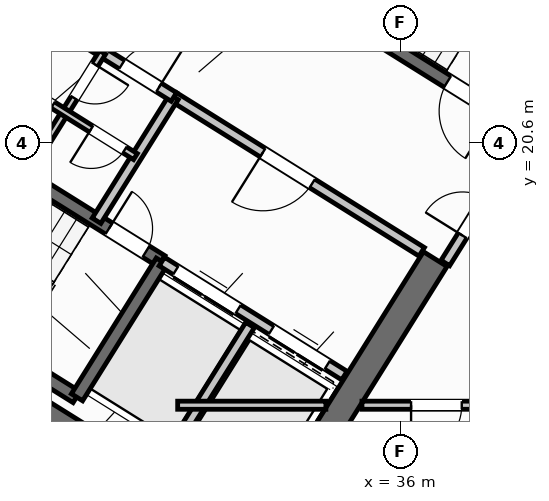
"""IFC4 building model, lengths in metres.
Left out: names, types, materials, properties, quantities, classifications, styles, units other than length and angle.
Written with IfcOpenShell. Run it as: python <this file> out.ifc"""

import sys

from ifc_helpers import new_model, si_unit, direction, frame, frame_2d, origin, place, context, subcontext, project, spatial, rectangle, extrude, source, transform, mapped, element, fill, save


model = new_model("IFC4")
c1 = context("Model", 3, precision=1e-05, world=origin(), true_north=direction((0.0, 1.0)))
c2 = subcontext(c1, "Body", "Model", "MODEL_VIEW")
j1 = project(units=[si_unit("LENGTHUNIT", "METRE"), si_unit("PLANEANGLEUNIT", "RADIAN")], contexts=[c1])
p1 = place(None, origin())
s1 = spatial("IfcSite", under=j1, at=p1, CompositionType="ELEMENT")
p2 = place(p1, origin())
s2 = spatial("IfcBuilding", under=s1, at=p2, CompositionType="ELEMENT")
p3 = place(p2, frame((0.0, 0.0, 158.7)))
s3 = spatial("IfcBuildingStorey", under=s2, at=p3, CompositionType="ELEMENT", Elevation=158.7)
p4 = place(p3, frame((33.366, 12.477, 0.0), z_axis=(0.0, 0.0, 1.0), x_axis=(-0.848047359947, 0.529920442413, 0.0)))
e1 = element("IfcWall", 1, at=p4, inside=s3, PredefinedType="SHEAR", context=c2, shape_type="SweptSolid", body=[
    extrude(rectangle(XDim=13.14, YDim=0.55, at=frame_2d((6.57, 0.0))), origin(), (0.0, 0.0, 1.0), 3.35),
])
p5 = place(p3, frame((36.683, 18.304, 0.0), z_axis=(0.0, 0.0, 1.0), x_axis=(-0.529896466841, -0.848062341122, 0.0)))
e2 = element("IfcWall", 2, at=p5, inside=s3, PredefinedType="SHEAR", context=c2, shape_type="SweptSolid", body=[
    extrude(rectangle(XDim=6.425, YDim=0.55, at=frame_2d((3.212, 0.0))), origin(), (0.0, 0.0, 1.0), 3.35),
])
p6 = place(p3, frame((29.268, 6.429, 0.0), z_axis=(0.0, 0.0, 1.0), x_axis=(-0.848049971435, 0.529916263149, 0.0)))
e3 = element("IfcWall", 3, at=p6, inside=s3, PredefinedType="STANDARD", context=c2, shape_type="SweptSolid", body=[
    extrude(rectangle(XDim=31.588, YDim=0.32, at=frame_2d((15.794, 0.0))), origin(), (0.0, 0.0, 1.0), 3.35),
])
p7 = place(p6, frame((16.362, 0.0, 0.0)))
e4 = element("IfcOpeningElement", 4, at=p7, cuts=e3, PredefinedType="OPENING", context=c2, shape_type="SweptSolid", body=[
    extrude(rectangle(XDim=1.2, YDim=2.15, at=frame_2d((0.6, 1.075))), frame((0.0, 0.17, 0.0), z_axis=(0.0, -1.0, 0.0), x_axis=(1.0, 0.0, 0.0)), (0.0, 0.0, 1.0), 0.34),
])
p8 = place(p6, frame((2.989, 0.0, 0.8)))
e5 = element("IfcOpeningElement", 5, at=p8, cuts=e3, PredefinedType="OPENING", context=c2, shape_type="SweptSolid", body=[
    extrude(rectangle(XDim=2.1, YDim=1.55, at=frame_2d((1.05, 0.775))), frame((0.0, 0.17, 0.0), z_axis=(0.0, -1.0, 0.0), x_axis=(1.0, 0.0, 0.0)), (0.0, 0.0, 1.0), 0.34),
])
p9 = place(p6, frame((8.359, 0.0, 0.8)))
e6 = element("IfcOpeningElement", 6, at=p9, cuts=e3, PredefinedType="OPENING", context=c2, shape_type="SweptSolid", body=[
    extrude(rectangle(XDim=2.1, YDim=1.55, at=frame_2d((1.05, 0.775))), frame((0.0, 0.17, 0.0), z_axis=(0.0, -1.0, 0.0), x_axis=(1.0, 0.0, 0.0)), (0.0, 0.0, 1.0), 0.34),
])
p10 = place(p6, frame((13.284, 0.0, 0.95)))
e7 = element("IfcOpeningElement", 7, at=p10, cuts=e3, PredefinedType="OPENING", context=c2, shape_type="SweptSolid", body=[
    extrude(rectangle(XDim=1.2, YDim=1.4, at=frame_2d((0.6, 0.7))), frame((0.0, 0.17, 0.0), z_axis=(0.0, -1.0, 0.0), x_axis=(1.0, 0.0, 0.0)), (0.0, 0.0, 1.0), 0.34),
])
p11 = place(p6, frame((20.259, 0.0, 0.95)))
e8 = element("IfcOpeningElement", 8, at=p11, cuts=e3, PredefinedType="OPENING", context=c2, shape_type="SweptSolid", body=[
    extrude(rectangle(XDim=1.2, YDim=1.4, at=frame_2d((0.6, 0.7))), frame((0.0, 0.17, 0.0), z_axis=(0.0, -1.0, 0.0), x_axis=(1.0, 0.0, 0.0)), (0.0, 0.0, 1.0), 0.34),
])
p12 = place(p6, frame((22.929, 0.0, 0.95)))
e9 = element("IfcOpeningElement", 9, at=p12, cuts=e3, PredefinedType="OPENING", context=c2, shape_type="SweptSolid", body=[
    extrude(rectangle(XDim=1.2, YDim=1.4, at=frame_2d((0.6, 0.7))), frame((0.0, 0.17, 0.0), z_axis=(0.0, -1.0, 0.0), x_axis=(1.0, 0.0, 0.0)), (0.0, 0.0, 1.0), 0.34),
])
p13 = place(p6, frame((27.481, 0.0, 0.8)))
e10 = element("IfcOpeningElement", 10, at=p13, cuts=e3, PredefinedType="OPENING", context=c2, shape_type="SweptSolid", body=[
    extrude(rectangle(XDim=2.1, YDim=1.55, at=frame_2d((1.05, 0.775))), frame((0.0, 0.17, 0.0), z_axis=(0.0, -1.0, 0.0), x_axis=(1.0, 0.0, 0.0)), (0.0, 0.0, 1.0), 0.34),
])
p14 = place(p3, frame((29.605, 15.581, 0.0), z_axis=(0.0, 0.0, 1.0), x_axis=(-0.848036911448, 0.529937163087, 0.0)))
e11 = element("IfcWall", 11, at=p14, inside=s3, PredefinedType="SHEAR", context=c2, shape_type="SweptSolid", body=[
    extrude(rectangle(XDim=7.46, YDim=0.26, at=frame_2d((3.73, 0.0))), origin(), (0.0, 0.0, 1.0), 3.35),
])
p15 = place(p3, frame((31.28, 18.261, 0.0), z_axis=(0.0, 0.0, 1.0), x_axis=(-0.848051618787, 0.529913626805, 0.0)))
e12 = element("IfcWall", 12, at=p15, inside=s3, PredefinedType="SHEAR", context=c2, shape_type="SweptSolid", body=[
    extrude(rectangle(XDim=7.46, YDim=0.26, at=frame_2d((3.73, 0.0))), origin(), (0.0, 0.0, 1.0), 3.35),
])
p16 = place(p15, frame((0.36, 0.0, 0.0)))
e13 = element("IfcOpeningElement", 13, at=p16, cuts=e12, PredefinedType="OPENING", context=c2, shape_type="SweptSolid", body=[
    extrude(rectangle(XDim=0.86, YDim=2.05, at=frame_2d((0.43, 1.025))), frame((0.0, 0.14, 0.0), z_axis=(0.0, -1.0, 0.0), x_axis=(1.0, 0.0, 0.0)), (0.0, 0.0, 1.0), 0.28),
])
p17 = place(p3, frame((31.288, 18.256, 0.0), z_axis=(0.0, 0.0, 1.0), x_axis=(-0.529943379326, -0.848033026897, 0.0)))
e14 = element("IfcWall", 14, at=p17, inside=s3, PredefinedType="SHEAR", context=c2, shape_type="SweptSolid", body=[
    extrude(rectangle(XDim=3.16, YDim=0.26, at=frame_2d((1.58, 0.0))), origin(), (0.0, 0.0, 1.0), 3.35),
])
p18 = place(p3, frame((38.046, 21.108, 0.0), z_axis=(0.0, 0.0, 1.0), x_axis=(-0.848054434086, 0.529909121291, 0.0)))
e15 = element("IfcWall", 15, at=p18, inside=s3, PredefinedType="SHEAR", context=c2, shape_type="SweptSolid", body=[
    extrude(rectangle(XDim=7.33, YDim=0.26, at=frame_2d((3.665, 0.0))), origin(), (0.0, 0.0, 1.0), 3.35),
])
p19 = place(p18, frame((0.22, 0.0, 0.0)))
e16 = element("IfcOpeningElement", 16, at=p19, cuts=e15, PredefinedType="OPENING", context=c2, shape_type="SweptSolid", body=[
    extrude(rectangle(XDim=1.1, YDim=2.1, at=frame_2d((0.55, 1.05))), frame((0.0, 0.14, 0.0), z_axis=(0.0, -1.0, 0.0), x_axis=(1.0, 0.0, 0.0)), (0.0, 0.0, 1.0), 0.28),
])
p20 = place(p3, frame((34.891, 16.005, 0.0), z_axis=(0.0, 0.0, 1.0), x_axis=(-0.848062873452, 0.529895614884, 0.0)))
e17 = element("IfcWall", 17, at=p20, inside=s3, PredefinedType="STANDARD", context=c2, shape_type="SweptSolid", body=[
    extrude(rectangle(XDim=4.248, YDim=0.2, at=frame_2d((2.124, 0.0))), origin(), (0.0, 0.0, 1.0), 3.34),
])
p21 = place(p20, frame((0.398, 0.0, 0.0)))
e18 = element("IfcOpeningElement", 18, at=p21, cuts=e17, PredefinedType="OPENING", context=c2, shape_type="SweptSolid", body=[
    extrude(rectangle(XDim=1.3, YDim=2.2, at=frame_2d((0.65, 1.1))), frame((0.0, 0.11, 0.0), z_axis=(0.0, -1.0, 0.0), x_axis=(1.0, 0.0, 0.0)), (0.0, 0.0, 1.0), 0.22),
])
p22 = place(p20, frame((2.473, 0.0, 0.0)))
e19 = element("IfcOpeningElement", 19, at=p22, cuts=e17, PredefinedType="OPENING", context=c2, shape_type="SweptSolid", body=[
    extrude(rectangle(XDim=1.45, YDim=2.25, at=frame_2d((0.725, 1.125))), frame((0.0, 0.11, 0.0), z_axis=(0.0, -1.0, 0.0), x_axis=(1.0, 0.0, 0.0)), (0.0, 0.0, 1.0), 0.22),
])
p23 = place(p3, frame((36.417, 18.447, 0.0), z_axis=(0.0, 0.0, 1.0), x_axis=(-0.848064879198, 0.529892404805, 0.0)))
e20 = element("IfcWall", 20, at=p23, inside=s3, PredefinedType="STANDARD", context=c2, shape_type="SweptSolid", body=[
    extrude(rectangle(XDim=5.768, YDim=0.2, at=frame_2d((2.884, 0.0))), origin(), (0.0, 0.0, 1.0), 3.34),
])
p24 = place(p23, frame((2.548, 0.0, 0.0)))
e21 = element("IfcOpeningElement", 21, at=p24, cuts=e20, PredefinedType="OPENING", context=c2, shape_type="SweptSolid", body=[
    extrude(rectangle(XDim=1.15, YDim=2.1, at=frame_2d((0.575, 1.05))), frame((0.0, 0.11, 0.0), z_axis=(0.0, -1.0, 0.0), x_axis=(1.0, 0.0, 0.0)), (0.0, 0.0, 1.0), 0.22),
])
p25 = place(p3, frame((33.029, 17.003, 0.0), z_axis=(0.0, 0.0, 1.0), x_axis=(-0.529916267533, -0.848049968695, 0.0)))
e22 = element("IfcWall", 22, at=p25, inside=s3, PredefinedType="STANDARD", context=c2, shape_type="SweptSolid", body=[
    extrude(rectangle(XDim=2.92, YDim=0.2, at=frame_2d((1.46, 0.0))), origin(), (0.0, 0.0, 1.0), 3.34),
])
p26 = place(p3, frame((31.525, 21.504, 0.0), z_axis=(0.0, 0.0, 1.0), x_axis=(-0.529907497854, -0.848055448493, 0.0)))
e23 = element("IfcWall", 23, at=p26, inside=s3, PredefinedType="STANDARD", context=c2, shape_type="SweptSolid", body=[
    extrude(rectangle(XDim=2.88, YDim=0.2, at=frame_2d((1.44, 0.0))), origin(), (0.0, 0.0, 1.0), 3.34),
])
p27 = place(p3, frame((31.525, 21.504, 0.0), z_axis=(0.0, 0.0, 1.0), x_axis=(-0.848040211232, 0.529931882541, 0.0)))
e24 = element("IfcWall", 24, at=p27, inside=s3, PredefinedType="STANDARD", context=c2, shape_type="SweptSolid", body=[
    extrude(rectangle(XDim=6.218, YDim=0.2, at=frame_2d((3.109, 0.0))), origin(), (0.0, 0.0, 1.0), 3.34),
])
p28 = place(p27, frame((4.4, 0.0, 0.0)))
e25 = element("IfcOpeningElement", 25, at=p28, cuts=e24, PredefinedType="OPENING", context=c2, shape_type="SweptSolid", body=[
    extrude(rectangle(XDim=0.86, YDim=2.05, at=frame_2d((0.43, 1.025))), frame((0.0, 0.11, 0.0), z_axis=(0.0, -1.0, 0.0), x_axis=(1.0, 0.0, 0.0)), (0.0, 0.0, 1.0), 0.22),
])
p29 = place(p27, frame((0.35, 0.0, 0.0)))
e26 = element("IfcOpeningElement", 26, at=p29, cuts=e24, PredefinedType="OPENING", context=c2, shape_type="SweptSolid", body=[
    extrude(rectangle(XDim=0.86, YDim=2.05, at=frame_2d((0.43, 1.025))), frame((0.0, 0.11, 0.0), z_axis=(0.0, -1.0, 0.0), x_axis=(1.0, 0.0, 0.0)), (0.0, 0.0, 1.0), 0.22),
])
p30 = place(p3, frame((30.117, 22.384, 0.0), z_axis=(0.0, 0.0, 1.0), x_axis=(-0.529951914384, -0.848027693204, 0.0)))
e27 = element("IfcWall", 27, at=p30, inside=s3, PredefinedType="PLUMBINGWALL", context=c2, shape_type="SweptSolid", body=[
    extrude(rectangle(XDim=1.4, YDim=0.14, at=frame_2d((0.7, 0.0))), origin(), (0.0, 0.0, 1.0), 3.34),
])
p31 = place(p30, frame((0.28, 0.0, 0.0)))
e28 = element("IfcOpeningElement", 28, at=p31, cuts=e27, PredefinedType="OPENING", context=c2, shape_type="SweptSolid", body=[
    extrude(rectangle(XDim=0.78, YDim=2.05, at=frame_2d((0.39, 1.025))), frame((0.0, 0.08, 0.0), z_axis=(0.0, -1.0, 0.0), x_axis=(1.0, 0.0, 0.0)), (0.0, 0.0, 1.0), 0.16),
])
p32 = place(p3, frame((29.375, 21.196, 0.0), z_axis=(0.0, 0.0, 1.0), x_axis=(-0.529865479138, -0.848081702443, 0.0)))
e29 = element("IfcWall", 29, at=p32, inside=s3, PredefinedType="PLUMBINGWALL", context=c2, shape_type="SweptSolid", body=[
    extrude(rectangle(XDim=1.48, YDim=0.14, at=frame_2d((0.74, 0.0))), origin(), (0.0, 0.0, 1.0), 3.34),
])
p33 = place(p3, frame((30.766, 20.327, 0.0), z_axis=(0.0, 0.0, 1.0), x_axis=(-0.848052663127, 0.529911955482, 0.0)))
e30 = element("IfcWall", 30, at=p33, inside=s3, PredefinedType="PLUMBINGWALL", context=c2, shape_type="SweptSolid", body=[
    extrude(rectangle(XDim=3.28, YDim=0.14, at=frame_2d((1.64, 0.0))), origin(), (0.0, 0.0, 1.0), 3.34),
])
p34 = place(p33, frame((0.25, 0.0, 0.0)))
e31 = element("IfcOpeningElement", 31, at=p34, cuts=e30, PredefinedType="OPENING", context=c2, shape_type="SweptSolid", body=[
    extrude(rectangle(XDim=0.78, YDim=2.05, at=frame_2d((0.39, 1.025))), frame((0.0, 0.08, 0.0), z_axis=(0.0, -1.0, 0.0), x_axis=(1.0, 0.0, 0.0)), (0.0, 0.0, 1.0), 0.16),
])
p35 = place(p33, frame((1.92, 0.0, 0.0)))
e32 = element("IfcOpeningElement", 32, at=p35, cuts=e30, PredefinedType="OPENING", context=c2, shape_type="SweptSolid", body=[
    extrude(rectangle(XDim=0.78, YDim=2.05, at=frame_2d((0.39, 1.025))), frame((0.0, 0.08, 0.0), z_axis=(0.0, -1.0, 0.0), x_axis=(1.0, 0.0, 0.0)), (0.0, 0.0, 1.0), 0.16),
])
p36 = place(p3, frame((32.164, 10.374, 0.0), z_axis=(0.0, 0.0, 1.0), x_axis=(-0.848044107957, 0.529925646633, 0.0)))
e33 = element("IfcWall", 33, at=p36, inside=s3, PredefinedType="PARTITIONING", context=c2, shape_type="SweptSolid", body=[
    extrude(rectangle(XDim=15.57, YDim=0.16, at=frame_2d((7.785, 0.0))), origin(), (0.0, 0.0, 1.0), 3.34),
])
p37 = place(p36, frame((10.83, 0.0, 0.0)))
e34 = element("IfcOpeningElement", 34, at=p37, cuts=e33, PredefinedType="OPENING", context=c2, shape_type="SweptSolid", body=[
    extrude(rectangle(XDim=1.0, YDim=2.1, at=frame_2d((0.5, 1.05))), frame((0.0, 0.09, 0.0), z_axis=(0.0, -1.0, 0.0), x_axis=(1.0, 0.0, 0.0)), (0.0, 0.0, 1.0), 0.18),
])
p38 = place(p3, frame((29.72, 8.859, 0.0), z_axis=(0.0, 0.0, 1.0), x_axis=(-0.848049134363, 0.529917602752, 0.0)))
e35 = element("IfcWall", 35, at=p38, inside=s3, PredefinedType="PLUMBINGWALL", context=c2, shape_type="SweptSolid", body=[
    extrude(rectangle(XDim=14.3, YDim=0.14, at=frame_2d((7.15, 0.0))), origin(), (0.0, 0.0, 1.0), 3.34),
])
p39 = place(p38, frame((9.57, 0.0, 0.0)))
e36 = element("IfcOpeningElement", 36, at=p39, cuts=e35, PredefinedType="OPENING", context=c2, shape_type="SweptSolid", body=[
    extrude(rectangle(XDim=0.92, YDim=2.08, at=frame_2d((0.46, 1.04))), frame((0.0, 0.08, 0.0), z_axis=(0.0, -1.0, 0.0), x_axis=(1.0, 0.0, 0.0)), (0.0, 0.0, 1.0), 0.16),
])
p40 = place(p3, frame((38.451, 20.737, 0.0), z_axis=(0.0, 0.0, 1.0), x_axis=(-0.529924799939, -0.848044637038, 0.0)))
e37 = element("IfcWall", 37, at=p40, inside=s3, PredefinedType="STANDARD", context=c2, shape_type="SweptSolid", body=[
    extrude(rectangle(XDim=2.96, YDim=0.2, at=frame_2d((1.48, 0.0))), origin(), (0.0, 0.0, 1.0), 3.34),
])
p41 = place(p40, frame((1.46, 0.0, 0.0)))
e38 = element("IfcOpeningElement", 38, at=p41, cuts=e37, PredefinedType="OPENING", context=c2, shape_type="SweptSolid", body=[
    extrude(rectangle(XDim=0.86, YDim=2.05, at=frame_2d((0.43, 1.025))), frame((0.0, 0.11, 0.0), z_axis=(0.0, -1.0, 0.0), x_axis=(1.0, 0.0, 0.0)), (0.0, 0.0, 1.0), 0.22),
])
p42 = place(p3, frame((31.6, 15.42, 0.0), z_axis=(0.0, 0.0, 1.0), x_axis=(1.0, 0.0, 0.0)))
e39 = element("IfcWall", 39, at=p42, inside=s3, PredefinedType="PARTITIONING", context=c2, shape_type="SweptSolid", body=[
    extrude(rectangle(XDim=2.925, YDim=0.16, at=frame_2d((1.462, 0.0))), origin(), (0.0, 0.0, 1.0), 3.34),
])
p43 = place(p3, frame((35.237, 15.42, 0.0), z_axis=(0.0, 0.0, 1.0), x_axis=(1.0, 0.0, 0.0)))
e40 = element("IfcWall", 40, at=p43, inside=s3, PredefinedType="PARTITIONING", context=c2, shape_type="SweptSolid", body=[
    extrude(rectangle(XDim=15.432, YDim=0.16, at=frame_2d((7.716, 0.0))), origin(), (0.0, 0.0, 1.0), 3.34),
])
p44 = place(p43, frame((0.969, 0.0, 0.0)))
e41 = element("IfcOpeningElement", 41, at=p44, cuts=e40, PredefinedType="OPENING", context=c2, shape_type="SweptSolid", body=[
    extrude(rectangle(XDim=1.0, YDim=2.1, at=frame_2d((0.5, 1.05))), frame((0.0, 0.09, 0.0), z_axis=(0.0, -1.0, 0.0), x_axis=(1.0, 0.0, 0.0)), (0.0, 0.0, 1.0), 0.18),
])
p45 = place(p43, frame((8.799, 0.0, 0.0)))
e42 = element("IfcOpeningElement", 42, at=p45, cuts=e40, PredefinedType="OPENING", context=c2, shape_type="SweptSolid", body=[
    extrude(rectangle(XDim=1.0, YDim=2.1, at=frame_2d((0.5, 1.05))), frame((0.0, 0.09, 0.0), z_axis=(0.0, -1.0, 0.0), x_axis=(1.0, 0.0, 0.0)), (0.0, 0.0, 1.0), 0.18),
])
m1 = source(origin(), c2, "Body", "SweptSolid", [
    extrude(rectangle(XDim=0.86, YDim=2.05, at=frame_2d((0.43, 1.025))), frame((0.0, 0.025, 0.0), z_axis=(0.0, -1.0, 0.0), x_axis=(1.0, 0.0, 0.0)), (0.0, 0.0, 1.0), 0.05),
])
p46 = place(p16, frame((0.86, 0.0, 0.0), z_axis=(0.0, 0.0, 1.0), x_axis=(-1.0, 0.0, 0.0)))
e43 = element("IfcDoor", 43, at=p46, inside=s3, OperationType="SINGLE_SWING_LEFT", PredefinedType="DOOR", context=c2, shape_type="MappedRepresentation", body=[
    mapped(m1, transform((0.0, 0.0, 0.0), scale=1.0)),
])
fill(e13, e43)
m2 = source(origin(), c2, "Body", "SweptSolid", [
    extrude(rectangle(XDim=1.1, YDim=2.1, at=frame_2d((0.55, 1.05))), frame((0.0, 0.025, 0.0), z_axis=(0.0, -1.0, 0.0), x_axis=(1.0, 0.0, 0.0)), (0.0, 0.0, 1.0), 0.05),
])
p47 = place(p19, origin())
e44 = element("IfcDoor", 44, at=p47, inside=s3, OperationType="SINGLE_SWING_LEFT", PredefinedType="DOOR", context=c2, shape_type="MappedRepresentation", body=[
    mapped(m2, transform((0.0, 0.0, 0.0), scale=1.0)),
])
fill(e16, e44)
m3 = source(origin(), c2, "Body", "SweptSolid", [
    extrude(rectangle(XDim=1.15, YDim=2.1, at=frame_2d((0.575, 1.05))), frame((0.0, 0.025, 0.0), z_axis=(0.0, -1.0, 0.0), x_axis=(1.0, 0.0, 0.0)), (0.0, 0.0, 1.0), 0.05),
])
p48 = place(p24, origin())
e45 = element("IfcDoor", 45, at=p48, inside=s3, OperationType="SINGLE_SWING_RIGHT", PredefinedType="DOOR", context=c2, shape_type="MappedRepresentation", body=[
    mapped(m3, transform((0.0, 0.0, 0.0), scale=1.0)),
])
fill(e21, e45)
m4 = source(origin(), c2, "Body", "SweptSolid", [
    extrude(rectangle(XDim=1.3, YDim=2.2, at=frame_2d((0.65, 1.1))), frame((0.0, 0.025, 0.0), z_axis=(0.0, -1.0, 0.0), x_axis=(1.0, 0.0, 0.0)), (0.0, 0.0, 1.0), 0.05),
])
p49 = place(p21, origin())
e46 = element("IfcDoor", 46, at=p49, inside=s3, OperationType="DOUBLE_DOOR_SLIDING", PredefinedType="DOOR", context=c2, shape_type="MappedRepresentation", body=[
    mapped(m4, transform((0.0, 0.0, 0.0), scale=1.0)),
])
fill(e18, e46)
m5 = source(origin(), c2, "Body", "SweptSolid", [
    extrude(rectangle(XDim=1.45, YDim=2.25, at=frame_2d((0.725, 1.125))), frame((0.0, 0.025, 0.0), z_axis=(0.0, -1.0, 0.0), x_axis=(1.0, 0.0, 0.0)), (0.0, 0.0, 1.0), 0.05),
])
p50 = place(p22, origin())
e47 = element("IfcDoor", 47, at=p50, inside=s3, OperationType="DOUBLE_DOOR_SLIDING", PredefinedType="DOOR", context=c2, shape_type="MappedRepresentation", body=[
    mapped(m5, transform((0.0, 0.0, 0.0), scale=1.0)),
])
fill(e19, e47)
p51 = place(p29, frame((0.86, 0.0, 0.0), z_axis=(0.0, 0.0, 1.0), x_axis=(-1.0, 0.0, 0.0)))
e48 = element("IfcDoor", 48, at=p51, inside=s3, OperationType="SINGLE_SWING_RIGHT", PredefinedType="DOOR", context=c2, shape_type="MappedRepresentation", body=[
    mapped(m1, transform((0.0, 0.0, 0.0), scale=1.0)),
])
fill(e26, e48)
m6 = source(origin(), c2, "Body", "SweptSolid", [
    extrude(rectangle(XDim=0.78, YDim=2.05, at=frame_2d((0.39, 1.025))), frame((0.0, 0.025, 0.0), z_axis=(0.0, -1.0, 0.0), x_axis=(1.0, 0.0, 0.0)), (0.0, 0.0, 1.0), 0.05),
])
p52 = place(p31, origin())
e49 = element("IfcDoor", 49, at=p52, inside=s3, OperationType="SINGLE_SWING_LEFT", PredefinedType="DOOR", context=c2, shape_type="MappedRepresentation", body=[
    mapped(m6, transform((0.0, 0.0, 0.0), scale=1.0)),
])
fill(e28, e49)
p53 = place(p34, origin())
e50 = element("IfcDoor", 50, at=p53, inside=s3, OperationType="SINGLE_SWING_RIGHT", PredefinedType="DOOR", context=c2, shape_type="MappedRepresentation", body=[
    mapped(m6, transform((0.0, 0.0, 0.0), scale=1.0)),
])
fill(e31, e50)
p54 = place(p35, origin())
e51 = element("IfcDoor", 51, at=p54, inside=s3, OperationType="SINGLE_SWING_LEFT", PredefinedType="DOOR", context=c2, shape_type="MappedRepresentation", body=[
    mapped(m6, transform((0.0, 0.0, 0.0), scale=1.0)),
])
fill(e32, e51)
p55 = place(p41, frame((0.86, 0.0, 0.0), z_axis=(0.0, 0.0, 1.0), x_axis=(-1.0, 0.0, 0.0)))
e52 = element("IfcDoor", 52, at=p55, inside=s3, OperationType="SINGLE_SWING_LEFT", PredefinedType="DOOR", context=c2, shape_type="MappedRepresentation", body=[
    mapped(m1, transform((0.0, 0.0, 0.0), scale=1.0)),
])
fill(e38, e52)
m7 = source(origin(), c2, "Body", "SweptSolid", [
    extrude(rectangle(XDim=1.0, YDim=2.1, at=frame_2d((0.5, 1.05))), frame((0.0, 0.025, 0.0), z_axis=(0.0, -1.0, 0.0), x_axis=(1.0, 0.0, 0.0)), (0.0, 0.0, 1.0), 0.05),
])
p56 = place(p44, frame((1.0, 0.0, 0.0), z_axis=(0.0, 0.0, 1.0), x_axis=(-1.0, 0.0, 0.0)))
e53 = element("IfcDoor", 53, at=p56, inside=s3, OperationType="SINGLE_SWING_RIGHT", PredefinedType="DOOR", context=c2, shape_type="MappedRepresentation", body=[
    mapped(m7, transform((0.0, 0.0, 0.0), scale=1.0)),
])
fill(e41, e53)
save(model, sys.argv[1])
